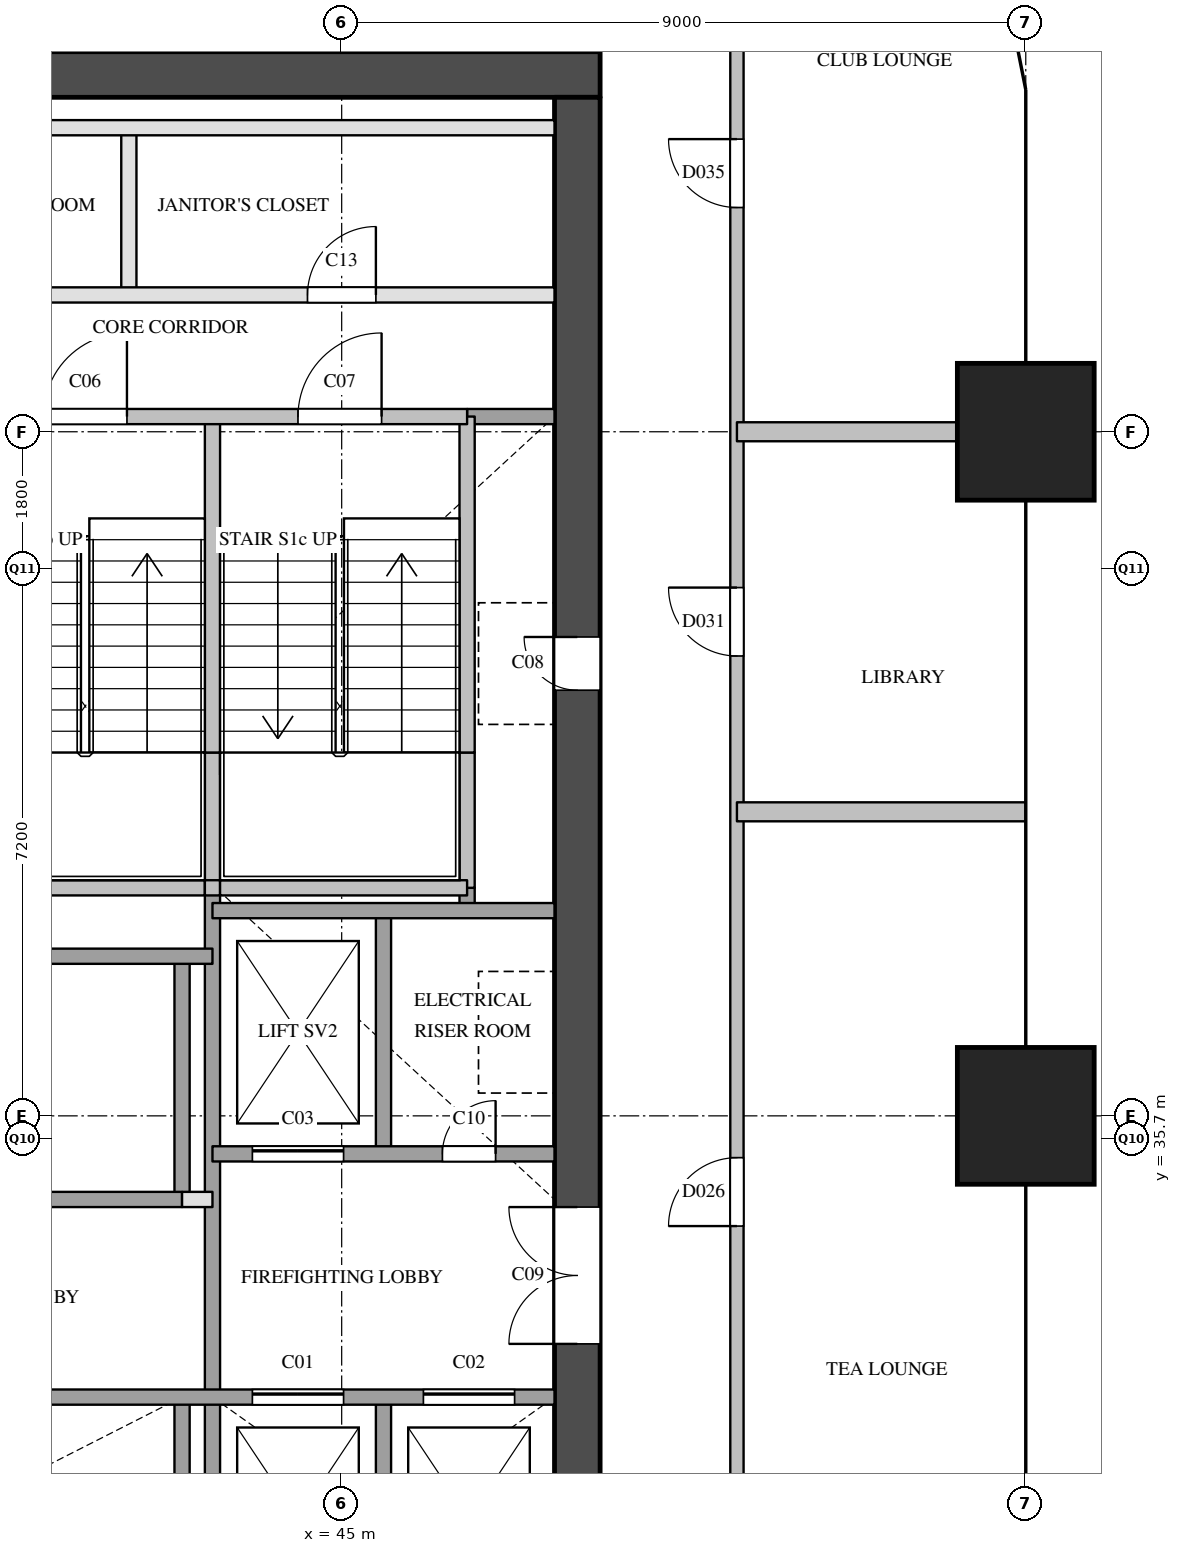
"""IFC4 building model, lengths in metres.
Left out: names, types, materials, properties, quantities, classifications, styles, units other than length and angle.
Written with IfcOpenShell. Run it as: python <this file> out.ifc"""

import sys

from ifc_helpers import new_model, si_unit, direction, frame, frame_2d, origin, origin_2d, place, context, subcontext, project, spatial, rectangle, extrude, element, fill, save


model = new_model("IFC4")
c1 = context("Model", 3, precision=1e-05, world=origin(), true_north=direction((0.0, 1.0)))
c2 = subcontext(c1, "Body", "Model", "MODEL_VIEW")
j1 = project(units=[si_unit("LENGTHUNIT", "METRE"), si_unit("PLANEANGLEUNIT", "RADIAN")], contexts=[c1])
p1 = place(None, origin())
s1 = spatial("IfcSite", under=j1, at=p1, CompositionType="ELEMENT")
p2 = place(p1, origin())
s2 = spatial("IfcBuilding", under=s1, at=p2, CompositionType="ELEMENT")
p3 = place(p2, frame((0.0, 0.0, 42.4)))
s3 = spatial("IfcBuildingStorey", under=s2, at=p3, CompositionType="ELEMENT", Elevation=42.4)
for number, where, z_axis, x_axis in (
    (1, (54.0, 36.0, 0.0), (0.0, 0.0, 1.0), (1.0, 0.0, 0.0)),
    (2, (54.0, 45.0, 0.0), (0.0, 0.0, 1.0), (1.0, 0.0, 0.0)),
):
    element("IfcColumn", number, at=place(p3, frame(where, z_axis=z_axis, x_axis=x_axis)), inside=s3, PredefinedType="COLUMN", context=c2, shape_type="SweptSolid", body=[
        extrude(rectangle(XDim=1.8, YDim=1.8, at=origin_2d()), origin(), (0.0, 0.0, 1.0), 3.8),
    ])
p4 = place(p3, frame((36.0, 49.7, 0.0), z_axis=(0.0, 0.0, 1.0), x_axis=(1.0, 0.0, 0.0)))
e3 = element("IfcWall", 3, at=p4, inside=s3, PredefinedType="SHEAR", context=c2, shape_type="SweptSolid", body=[
    extrude(rectangle(XDim=12.4, YDim=0.6, at=frame_2d((6.2, 0.0))), origin(), (0.0, 0.0, 1.0), 3.5),
])
p5 = place(p3, frame((48.1, 29.1, 0.0), z_axis=(0.0, 0.0, 1.0), x_axis=(0.0, 1.0, 0.0)))
e4 = element("IfcWall", 4, at=p5, inside=s3, PredefinedType="SHEAR", context=c2, shape_type="SweptSolid", body=[
    extrude(rectangle(XDim=20.3, YDim=0.6, at=frame_2d((10.15, 0.0))), origin(), (0.0, 0.0, 1.0), 3.5),
])
p6 = place(p5, frame((12.5, 0.0, 0.0)))
e5 = element("IfcOpeningElement", 5, at=p6, cuts=e4, PredefinedType="OPENING", context=c2, shape_type="SweptSolid", body=[
    extrude(rectangle(XDim=0.7, YDim=2.1, at=frame_2d((0.35, 1.05))), frame((0.0, 0.31, 0.0), z_axis=(0.0, -1.0, 0.0), x_axis=(1.0, 0.0, 0.0)), (0.0, 0.0, 1.0), 0.62),
])
p7 = place(p5, frame((3.9, 0.0, 0.0)))
e6 = element("IfcOpeningElement", 6, at=p7, cuts=e4, PredefinedType="OPENING", context=c2, shape_type="SweptSolid", body=[
    extrude(rectangle(XDim=1.8, YDim=2.1, at=frame_2d((0.9, 1.05))), frame((0.0, 0.31, 0.0), z_axis=(0.0, -1.0, 0.0), x_axis=(1.0, 0.0, 0.0)), (0.0, 0.0, 1.0), 0.62),
])
p8 = place(p3, frame((42.2, 46.8, 0.0), z_axis=(0.0, 0.0, 1.0), x_axis=(0.0, 1.0, 0.0)))
e7 = element("IfcWall", 7, at=p8, inside=s3, PredefinedType="PARTITIONING", context=c2, shape_type="SweptSolid", body=[
    extrude(rectangle(XDim=2.2, YDim=0.2, at=frame_2d((1.1, 0.0))), origin(), (0.0, 0.0, 1.0), 3.5),
])
p9 = place(p3, frame((42.9, 29.1, 0.0), z_axis=(0.0, 0.0, 1.0), x_axis=(0.0, 1.0, 0.0)))
e8 = element("IfcWall", 8, at=p9, inside=s3, PredefinedType="SOLIDWALL", context=c2, shape_type="SweptSolid", body=[
    extrude(rectangle(XDim=3.2, YDim=0.2, at=frame_2d((1.6, 0.0))), origin(), (0.0, 0.0, 1.0), 3.5),
])
p10 = place(p3, frame((42.9, 34.9, 0.0), z_axis=(0.0, 0.0, 1.0), x_axis=(0.0, 1.0, 0.0)))
e9 = element("IfcWall", 9, at=p10, inside=s3, PredefinedType="SOLIDWALL", context=c2, shape_type="SweptSolid", body=[
    extrude(rectangle(XDim=3.2, YDim=0.2, at=frame_2d((1.6, 0.0))), origin(), (0.0, 0.0, 1.0), 3.5),
])
p11 = place(p3, frame((43.3, 29.1, 0.0), z_axis=(0.0, 0.0, 1.0), x_axis=(0.0, 1.0, 0.0)))
e10 = element("IfcWall", 10, at=p11, inside=s3, PredefinedType="SOLIDWALL", context=c2, shape_type="SweptSolid", body=[
    extrude(rectangle(XDim=9.9, YDim=0.2, at=frame_2d((4.95, 0.0))), origin(), (0.0, 0.0, 1.0), 3.5),
])
p12 = place(p3, frame((43.3, 39.0, 0.0), z_axis=(0.0, 0.0, 1.0), x_axis=(0.0, 1.0, 0.0)))
e11 = element("IfcWall", 11, at=p12, inside=s3, PredefinedType="SOLIDWALL", context=c2, shape_type="SweptSolid", body=[
    extrude(rectangle(XDim=1.78, YDim=0.2, at=frame_2d((0.89, 0.0))), origin(), (0.0, 0.0, 1.0), 3.5),
])
p13 = place(p3, frame((43.3, 40.78, 0.0), z_axis=(0.0, 0.0, 1.0), x_axis=(0.0, 1.0, 0.0)))
e12 = element("IfcWall", 12, at=p13, inside=s3, PredefinedType="SOLIDWALL", context=c2, shape_type="SweptSolid", body=[
    extrude(rectangle(XDim=4.42, YDim=0.2, at=frame_2d((2.21, 0.0))), origin(), (0.0, 0.0, 1.0), 3.5),
])
for number, where, z_axis, x_axis in (
    (13, (45.55, 29.1, 0.0), (0.0, 0.0, 1.0), (0.0, 1.0, 0.0)),
    (14, (45.55, 35.5, 0.0), (0.0, 0.0, 1.0), (0.0, 1.0, 0.0)),
):
    element("IfcWall", number, at=place(p3, frame(where, z_axis=z_axis, x_axis=x_axis)), inside=s3, PredefinedType="SOLIDWALL", context=c2, shape_type="SweptSolid", body=[
        extrude(rectangle(XDim=3.2, YDim=0.2, at=frame_2d((1.6, 0.0))), origin(), (0.0, 0.0, 1.0), 3.5),
    ])
p14 = place(p3, frame((46.65, 38.7, 0.0), z_axis=(0.0, 0.0, 1.0), x_axis=(0.0, 1.0, 0.0)))
e15 = element("IfcWall", 15, at=p14, inside=s3, PredefinedType="SOLIDWALL", context=c2, shape_type="SweptSolid", body=[
    extrude(rectangle(XDim=0.3, YDim=0.2, at=frame_2d((0.15, 0.0))), origin(), (0.0, 0.0, 1.0), 3.5),
])
p15 = place(p3, frame((46.65, 39.0, 0.0), z_axis=(0.0, 0.0, 1.0), x_axis=(0.0, 1.0, 0.0)))
e16 = element("IfcWall", 16, at=p15, inside=s3, PredefinedType="SOLIDWALL", context=c2, shape_type="SweptSolid", body=[
    extrude(rectangle(XDim=1.78, YDim=0.2, at=frame_2d((0.89, 0.0))), origin(), (0.0, 0.0, 1.0), 3.5),
])
p16 = place(p3, frame((46.65, 40.78, 0.0), z_axis=(0.0, 0.0, 1.0), x_axis=(0.0, 1.0, 0.0)))
e17 = element("IfcWall", 17, at=p16, inside=s3, PredefinedType="SOLIDWALL", context=c2, shape_type="SweptSolid", body=[
    extrude(rectangle(XDim=4.42, YDim=0.2, at=frame_2d((2.21, 0.0))), origin(), (0.0, 0.0, 1.0), 3.5),
])
p17 = place(p3, frame((36.6, 32.3, 0.0), z_axis=(0.0, 0.0, 1.0), x_axis=(1.0, 0.0, 0.0)))
e18 = element("IfcWall", 18, at=p17, inside=s3, PredefinedType="SOLIDWALL", context=c2, shape_type="SweptSolid", body=[
    extrude(rectangle(XDim=11.2, YDim=0.2, at=frame_2d((5.6, 0.0))), origin(), (0.0, 0.0, 1.0), 3.5),
])
p18 = place(p17, frame((7.225, 0.0, 0.0)))
e19 = element("IfcOpeningElement", 19, at=p18, cuts=e18, PredefinedType="OPENING", context=c2, shape_type="SweptSolid", body=[
    extrude(rectangle(XDim=1.2, YDim=2.1, at=frame_2d((0.6, 1.05))), frame((0.0, 0.11, 0.0), z_axis=(0.0, -1.0, 0.0), x_axis=(1.0, 0.0, 0.0)), (0.0, 0.0, 1.0), 0.22),
])
p19 = place(p17, frame((9.475, 0.0, 0.0)))
e20 = element("IfcOpeningElement", 20, at=p19, cuts=e18, PredefinedType="OPENING", context=c2, shape_type="SweptSolid", body=[
    extrude(rectangle(XDim=1.2, YDim=2.1, at=frame_2d((0.6, 1.05))), frame((0.0, 0.11, 0.0), z_axis=(0.0, -1.0, 0.0), x_axis=(1.0, 0.0, 0.0)), (0.0, 0.0, 1.0), 0.22),
])
p20 = place(p3, frame((42.9, 34.9, 0.0), z_axis=(0.0, 0.0, 1.0), x_axis=(1.0, 0.0, 0.0)))
e21 = element("IfcWall", 21, at=p20, inside=s3, PredefinedType="PARTITIONING", context=c2, shape_type="SweptSolid", body=[
    extrude(rectangle(XDim=0.4, YDim=0.2, at=frame_2d((0.2, 0.0))), origin(), (0.0, 0.0, 1.0), 3.5),
])
p21 = place(p3, frame((36.6, 34.9, 0.0), z_axis=(0.0, 0.0, 1.0), x_axis=(1.0, 0.0, 0.0)))
e22 = element("IfcWall", 22, at=p21, inside=s3, PredefinedType="SOLIDWALL", context=c2, shape_type="SweptSolid", body=[
    extrude(rectangle(XDim=6.3, YDim=0.2, at=frame_2d((3.15, 0.0))), origin(), (0.0, 0.0, 1.0), 3.5),
])
p22 = place(p3, frame((43.3, 35.5, 0.0), z_axis=(0.0, 0.0, 1.0), x_axis=(1.0, 0.0, 0.0)))
e23 = element("IfcWall", 23, at=p22, inside=s3, PredefinedType="SOLIDWALL", context=c2, shape_type="SweptSolid", body=[
    extrude(rectangle(XDim=4.5, YDim=0.2, at=frame_2d((2.25, 0.0))), origin(), (0.0, 0.0, 1.0), 3.5),
])
p23 = place(p22, frame((0.525, 0.0, 0.0)))
e24 = element("IfcOpeningElement", 24, at=p23, cuts=e23, PredefinedType="OPENING", context=c2, shape_type="SweptSolid", body=[
    extrude(rectangle(XDim=1.2, YDim=2.1, at=frame_2d((0.6, 1.05))), frame((0.0, 0.11, 0.0), z_axis=(0.0, -1.0, 0.0), x_axis=(1.0, 0.0, 0.0)), (0.0, 0.0, 1.0), 0.22),
])
p24 = place(p22, frame((3.025, 0.0, 0.0)))
e25 = element("IfcOpeningElement", 25, at=p24, cuts=e23, PredefinedType="OPENING", context=c2, shape_type="SweptSolid", body=[
    extrude(rectangle(XDim=0.7, YDim=2.1, at=frame_2d((0.35, 1.05))), frame((0.0, 0.11, 0.0), z_axis=(0.0, -1.0, 0.0), x_axis=(1.0, 0.0, 0.0)), (0.0, 0.0, 1.0), 0.22),
])
p25 = place(p3, frame((36.6, 38.1, 0.0), z_axis=(0.0, 0.0, 1.0), x_axis=(1.0, 0.0, 0.0)))
e26 = element("IfcWall", 26, at=p25, inside=s3, PredefinedType="SOLIDWALL", context=c2, shape_type="SweptSolid", body=[
    extrude(rectangle(XDim=6.7, YDim=0.2, at=frame_2d((3.35, 0.0))), origin(), (0.0, 0.0, 1.0), 3.5),
])
p26 = place(p3, frame((43.3, 38.7, 0.0), z_axis=(0.0, 0.0, 1.0), x_axis=(1.0, 0.0, 0.0)))
e27 = element("IfcWall", 27, at=p26, inside=s3, PredefinedType="SOLIDWALL", context=c2, shape_type="SweptSolid", body=[
    extrude(rectangle(XDim=4.5, YDim=0.2, at=frame_2d((2.25, 0.0))), origin(), (0.0, 0.0, 1.0), 3.5),
])
p27 = place(p3, frame((40.05, 39.0, 0.0), z_axis=(0.0, 0.0, 1.0), x_axis=(1.0, 0.0, 0.0)))
e28 = element("IfcWall", 28, at=p27, inside=s3, PredefinedType="SOLIDWALL", context=c2, shape_type="SweptSolid", body=[
    extrude(rectangle(XDim=3.15, YDim=0.2, at=frame_2d((1.575, 0.0))), origin(), (0.0, 0.0, 1.0), 3.5),
])
p28 = place(p3, frame((43.2, 39.0, 0.0), z_axis=(0.0, 0.0, 1.0), x_axis=(1.0, 0.0, 0.0)))
e29 = element("IfcWall", 29, at=p28, inside=s3, PredefinedType="SOLIDWALL", context=c2, shape_type="SweptSolid", body=[
    extrude(rectangle(XDim=0.2, YDim=0.2, at=frame_2d((0.1, 0.0))), origin(), (0.0, 0.0, 1.0), 3.5),
])
p29 = place(p3, frame((43.4, 39.0, 0.0), z_axis=(0.0, 0.0, 1.0), x_axis=(1.0, 0.0, 0.0)))
e30 = element("IfcWall", 30, at=p29, inside=s3, PredefinedType="SOLIDWALL", context=c2, shape_type="SweptSolid", body=[
    extrude(rectangle(XDim=3.25, YDim=0.2, at=frame_2d((1.625, 0.0))), origin(), (0.0, 0.0, 1.0), 3.5),
])
p30 = place(p3, frame((46.65, 45.2, 0.0), z_axis=(0.0, 0.0, 1.0), x_axis=(1.0, 0.0, 0.0)))
e31 = element("IfcWall", 31, at=p30, inside=s3, PredefinedType="SOLIDWALL", context=c2, shape_type="SweptSolid", body=[
    extrude(rectangle(XDim=1.15, YDim=0.2, at=frame_2d((0.575, 0.0))), origin(), (0.0, 0.0, 1.0), 3.5),
])
p31 = place(p3, frame((36.6, 45.2, 0.0), z_axis=(0.0, 0.0, 1.0), x_axis=(1.0, 0.0, 0.0)))
e32 = element("IfcWall", 32, at=p31, inside=s3, PredefinedType="SOLIDWALL", context=c2, shape_type="SweptSolid", body=[
    extrude(rectangle(XDim=10.05, YDim=0.2, at=frame_2d((5.025, 0.0))), origin(), (0.0, 0.0, 1.0), 3.5),
])
p32 = place(p31, frame((1.125, 0.0, 0.0)))
e33 = element("IfcOpeningElement", 33, at=p32, cuts=e32, PredefinedType="OPENING", context=c2, shape_type="SweptSolid", body=[
    extrude(rectangle(XDim=1.1, YDim=2.1, at=frame_2d((0.55, 1.05))), frame((0.0, 0.11, 0.0), z_axis=(0.0, -1.0, 0.0), x_axis=(1.0, 0.0, 0.0)), (0.0, 0.0, 1.0), 0.22),
])
p33 = place(p31, frame((4.475, 0.0, 0.0)))
e34 = element("IfcOpeningElement", 34, at=p33, cuts=e32, PredefinedType="OPENING", context=c2, shape_type="SweptSolid", body=[
    extrude(rectangle(XDim=1.1, YDim=2.1, at=frame_2d((0.55, 1.05))), frame((0.0, 0.11, 0.0), z_axis=(0.0, -1.0, 0.0), x_axis=(1.0, 0.0, 0.0)), (0.0, 0.0, 1.0), 0.22),
])
p34 = place(p31, frame((7.825, 0.0, 0.0)))
e35 = element("IfcOpeningElement", 35, at=p34, cuts=e32, PredefinedType="OPENING", context=c2, shape_type="SweptSolid", body=[
    extrude(rectangle(XDim=1.1, YDim=2.1, at=frame_2d((0.55, 1.05))), frame((0.0, 0.11, 0.0), z_axis=(0.0, -1.0, 0.0), x_axis=(1.0, 0.0, 0.0)), (0.0, 0.0, 1.0), 0.22),
])
p35 = place(p3, frame((36.6, 46.8, 0.0), z_axis=(0.0, 0.0, 1.0), x_axis=(1.0, 0.0, 0.0)))
e36 = element("IfcWall", 36, at=p35, inside=s3, PredefinedType="PARTITIONING", context=c2, shape_type="SweptSolid", body=[
    extrude(rectangle(XDim=11.2, YDim=0.2, at=frame_2d((5.6, 0.0))), origin(), (0.0, 0.0, 1.0), 3.5),
])
p36 = place(p35, frame((2.35, 0.0, 0.0)))
e37 = element("IfcOpeningElement", 37, at=p36, cuts=e36, PredefinedType="OPENING", context=c2, shape_type="SweptSolid", body=[
    extrude(rectangle(XDim=0.9, YDim=2.1, at=frame_2d((0.45, 1.05))), frame((0.0, 0.11, 0.0), z_axis=(0.0, -1.0, 0.0), x_axis=(1.0, 0.0, 0.0)), (0.0, 0.0, 1.0), 0.22),
])
p37 = place(p35, frame((7.95, 0.0, 0.0)))
e38 = element("IfcOpeningElement", 38, at=p37, cuts=e36, PredefinedType="OPENING", context=c2, shape_type="SweptSolid", body=[
    extrude(rectangle(XDim=0.9, YDim=2.1, at=frame_2d((0.45, 1.05))), frame((0.0, 0.11, 0.0), z_axis=(0.0, -1.0, 0.0), x_axis=(1.0, 0.0, 0.0)), (0.0, 0.0, 1.0), 0.22),
])
p38 = place(p3, frame((36.6, 49.0, 0.0), z_axis=(0.0, 0.0, 1.0), x_axis=(1.0, 0.0, 0.0)))
e39 = element("IfcWall", 39, at=p38, inside=s3, PredefinedType="PARTITIONING", context=c2, shape_type="SweptSolid", body=[
    extrude(rectangle(XDim=11.2, YDim=0.2, at=frame_2d((5.6, 0.0))), origin(), (0.0, 0.0, 1.0), 3.5),
])
p39 = place(p3, frame((50.2, 26.7, 0.0), z_axis=(0.0, 0.0, 1.0), x_axis=(0.0, 1.0, 0.0)))
e40 = element("IfcWall", 40, at=p39, inside=s3, PredefinedType="PARTITIONING", context=c2, shape_type="SweptSolid", body=[
    extrude(rectangle(XDim=25.1, YDim=0.175, at=frame_2d((12.55, 0.0))), origin(), (0.0, 0.0, 1.0), 2.5),
])
p40 = place(p39, frame((1.15, 0.0, 0.0)))
e41 = element("IfcOpeningElement", 41, at=p40, cuts=e40, PredefinedType="OPENING", context=c2, shape_type="SweptSolid", body=[
    extrude(rectangle(XDim=1.0, YDim=2.1, at=frame_2d((0.5, 1.05))), frame((0.0, 0.097, 0.0), z_axis=(0.0, -1.0, 0.0), x_axis=(1.0, 0.0, 0.0)), (0.0, 0.0, 1.0), 0.195),
])
p41 = place(p39, frame((7.85, 0.0, 0.0)))
e42 = element("IfcOpeningElement", 42, at=p41, cuts=e40, PredefinedType="OPENING", context=c2, shape_type="SweptSolid", body=[
    extrude(rectangle(XDim=0.9, YDim=2.1, at=frame_2d((0.45, 1.05))), frame((0.0, 0.097, 0.0), z_axis=(0.0, -1.0, 0.0), x_axis=(1.0, 0.0, 0.0)), (0.0, 0.0, 1.0), 0.195),
])
p42 = place(p39, frame((15.35, 0.0, 0.0)))
e43 = element("IfcOpeningElement", 43, at=p42, cuts=e40, PredefinedType="OPENING", context=c2, shape_type="SweptSolid", body=[
    extrude(rectangle(XDim=0.9, YDim=2.1, at=frame_2d((0.45, 1.05))), frame((0.0, 0.097, 0.0), z_axis=(0.0, -1.0, 0.0), x_axis=(1.0, 0.0, 0.0)), (0.0, 0.0, 1.0), 0.195),
])
p43 = place(p39, frame((21.25, 0.0, 0.0)))
e44 = element("IfcOpeningElement", 44, at=p43, cuts=e40, PredefinedType="OPENING", context=c2, shape_type="SweptSolid", body=[
    extrude(rectangle(XDim=0.9, YDim=2.1, at=frame_2d((0.45, 1.05))), frame((0.0, 0.097, 0.0), z_axis=(0.0, -1.0, 0.0), x_axis=(1.0, 0.0, 0.0)), (0.0, 0.0, 1.0), 0.195),
])
p44 = place(p3, frame((50.2, 40.0, 0.0), z_axis=(0.0, 0.0, 1.0), x_axis=(1.0, 0.0, 0.0)))
e45 = element("IfcWall", 45, at=p44, inside=s3, PredefinedType="PARTITIONING", context=c2, shape_type="SweptSolid", body=[
    extrude(rectangle(XDim=3.8, YDim=0.25, at=frame_2d((1.9, 0.0))), origin(), (0.0, 0.0, 1.0), 2.5),
])
p45 = place(p3, frame((50.2, 45.0, 0.0), z_axis=(0.0, 0.0, 1.0), x_axis=(1.0, 0.0, 0.0)))
e46 = element("IfcWall", 46, at=p45, inside=s3, PredefinedType="PARTITIONING", context=c2, shape_type="SweptSolid", body=[
    extrude(rectangle(XDim=3.8, YDim=0.25, at=frame_2d((1.9, 0.0))), origin(), (0.0, 0.0, 1.0), 3.5),
])
p46 = place(p18, origin())
e47 = element("IfcDoor", 47, at=p46, inside=s3, OperationType="SLIDING_TO_LEFT", PredefinedType="DOOR", context=c2, shape_type="SweptSolid", body=[
    extrude(rectangle(XDim=1.2, YDim=2.1, at=frame_2d((0.6, 1.05))), frame((0.0, 0.025, 0.0), z_axis=(0.0, -1.0, 0.0), x_axis=(1.0, 0.0, 0.0)), (0.0, 0.0, 1.0), 0.05),
])
fill(e19, e47)
p47 = place(p19, origin())
e48 = element("IfcDoor", 48, at=p47, inside=s3, OperationType="SLIDING_TO_LEFT", PredefinedType="DOOR", context=c2, shape_type="SweptSolid", body=[
    extrude(rectangle(XDim=1.2, YDim=2.1, at=frame_2d((0.6, 1.05))), frame((0.0, 0.025, 0.0), z_axis=(0.0, -1.0, 0.0), x_axis=(1.0, 0.0, 0.0)), (0.0, 0.0, 1.0), 0.05),
])
fill(e20, e48)
p48 = place(p23, origin())
e49 = element("IfcDoor", 49, at=p48, inside=s3, OperationType="SLIDING_TO_LEFT", PredefinedType="DOOR", context=c2, shape_type="SweptSolid", body=[
    extrude(rectangle(XDim=1.2, YDim=2.1, at=frame_2d((0.6, 1.05))), frame((0.0, 0.025, 0.0), z_axis=(0.0, -1.0, 0.0), x_axis=(1.0, 0.0, 0.0)), (0.0, 0.0, 1.0), 0.05),
])
fill(e24, e49)
p49 = place(p33, origin())
e50 = element("IfcDoor", 50, at=p49, inside=s3, OperationType="SINGLE_SWING_RIGHT", PredefinedType="DOOR", context=c2, shape_type="SweptSolid", body=[
    extrude(rectangle(XDim=1.1, YDim=2.1, at=frame_2d((0.55, 1.05))), frame((0.0, 0.025, 0.0), z_axis=(0.0, -1.0, 0.0), x_axis=(1.0, 0.0, 0.0)), (0.0, 0.0, 1.0), 0.05),
])
fill(e34, e50)
p50 = place(p34, origin())
e51 = element("IfcDoor", 51, at=p50, inside=s3, OperationType="SINGLE_SWING_RIGHT", PredefinedType="DOOR", context=c2, shape_type="SweptSolid", body=[
    extrude(rectangle(XDim=1.1, YDim=2.1, at=frame_2d((0.55, 1.05))), frame((0.0, 0.025, 0.0), z_axis=(0.0, -1.0, 0.0), x_axis=(1.0, 0.0, 0.0)), (0.0, 0.0, 1.0), 0.05),
])
fill(e35, e51)
p51 = place(p6, origin())
e52 = element("IfcDoor", 52, at=p51, inside=s3, OperationType="SINGLE_SWING_RIGHT", PredefinedType="DOOR", context=c2, shape_type="SweptSolid", body=[
    extrude(rectangle(XDim=0.7, YDim=2.1, at=frame_2d((0.35, 1.05))), frame((0.0, 0.025, 0.0), z_axis=(0.0, -1.0, 0.0), x_axis=(1.0, 0.0, 0.0)), (0.0, 0.0, 1.0), 0.05),
])
fill(e5, e52)
p52 = place(p7, origin())
e53 = element("IfcDoor", 53, at=p52, inside=s3, OperationType="DOUBLE_DOOR_SINGLE_SWING", PredefinedType="DOOR", context=c2, shape_type="SweptSolid", body=[
    extrude(rectangle(XDim=1.8, YDim=2.1, at=frame_2d((0.9, 1.05))), frame((0.0, 0.025, 0.0), z_axis=(0.0, -1.0, 0.0), x_axis=(1.0, 0.0, 0.0)), (0.0, 0.0, 1.0), 0.05),
])
fill(e6, e53)
p53 = place(p24, origin())
e54 = element("IfcDoor", 54, at=p53, inside=s3, OperationType="SINGLE_SWING_RIGHT", PredefinedType="DOOR", context=c2, shape_type="SweptSolid", body=[
    extrude(rectangle(XDim=0.7, YDim=2.1, at=frame_2d((0.35, 1.05))), frame((0.0, 0.025, 0.0), z_axis=(0.0, -1.0, 0.0), x_axis=(1.0, 0.0, 0.0)), (0.0, 0.0, 1.0), 0.05),
])
fill(e25, e54)
p54 = place(p37, origin())
e55 = element("IfcDoor", 55, at=p54, inside=s3, OperationType="SINGLE_SWING_RIGHT", PredefinedType="DOOR", context=c2, shape_type="SweptSolid", body=[
    extrude(rectangle(XDim=0.9, YDim=2.1, at=frame_2d((0.45, 1.05))), frame((0.0, 0.025, 0.0), z_axis=(0.0, -1.0, 0.0), x_axis=(1.0, 0.0, 0.0)), (0.0, 0.0, 1.0), 0.05),
])
fill(e38, e55)
p55 = place(p41, origin())
e56 = element("IfcDoor", 56, at=p55, inside=s3, OperationType="SINGLE_SWING_LEFT", PredefinedType="DOOR", context=c2, shape_type="SweptSolid", body=[
    extrude(rectangle(XDim=0.9, YDim=2.1, at=frame_2d((0.45, 1.05))), frame((0.0, 0.025, 0.0), z_axis=(0.0, -1.0, 0.0), x_axis=(1.0, 0.0, 0.0)), (0.0, 0.0, 1.0), 0.05),
])
fill(e42, e56)
p56 = place(p42, origin())
e57 = element("IfcDoor", 57, at=p56, inside=s3, OperationType="SINGLE_SWING_RIGHT", PredefinedType="DOOR", context=c2, shape_type="SweptSolid", body=[
    extrude(rectangle(XDim=0.9, YDim=2.1, at=frame_2d((0.45, 1.05))), frame((0.0, 0.025, 0.0), z_axis=(0.0, -1.0, 0.0), x_axis=(1.0, 0.0, 0.0)), (0.0, 0.0, 1.0), 0.05),
])
fill(e43, e57)
p57 = place(p43, origin())
e58 = element("IfcDoor", 58, at=p57, inside=s3, OperationType="SINGLE_SWING_RIGHT", PredefinedType="DOOR", context=c2, shape_type="SweptSolid", body=[
    extrude(rectangle(XDim=0.9, YDim=2.1, at=frame_2d((0.45, 1.05))), frame((0.0, 0.025, 0.0), z_axis=(0.0, -1.0, 0.0), x_axis=(1.0, 0.0, 0.0)), (0.0, 0.0, 1.0), 0.05),
])
fill(e44, e58)
save(model, sys.argv[1])
